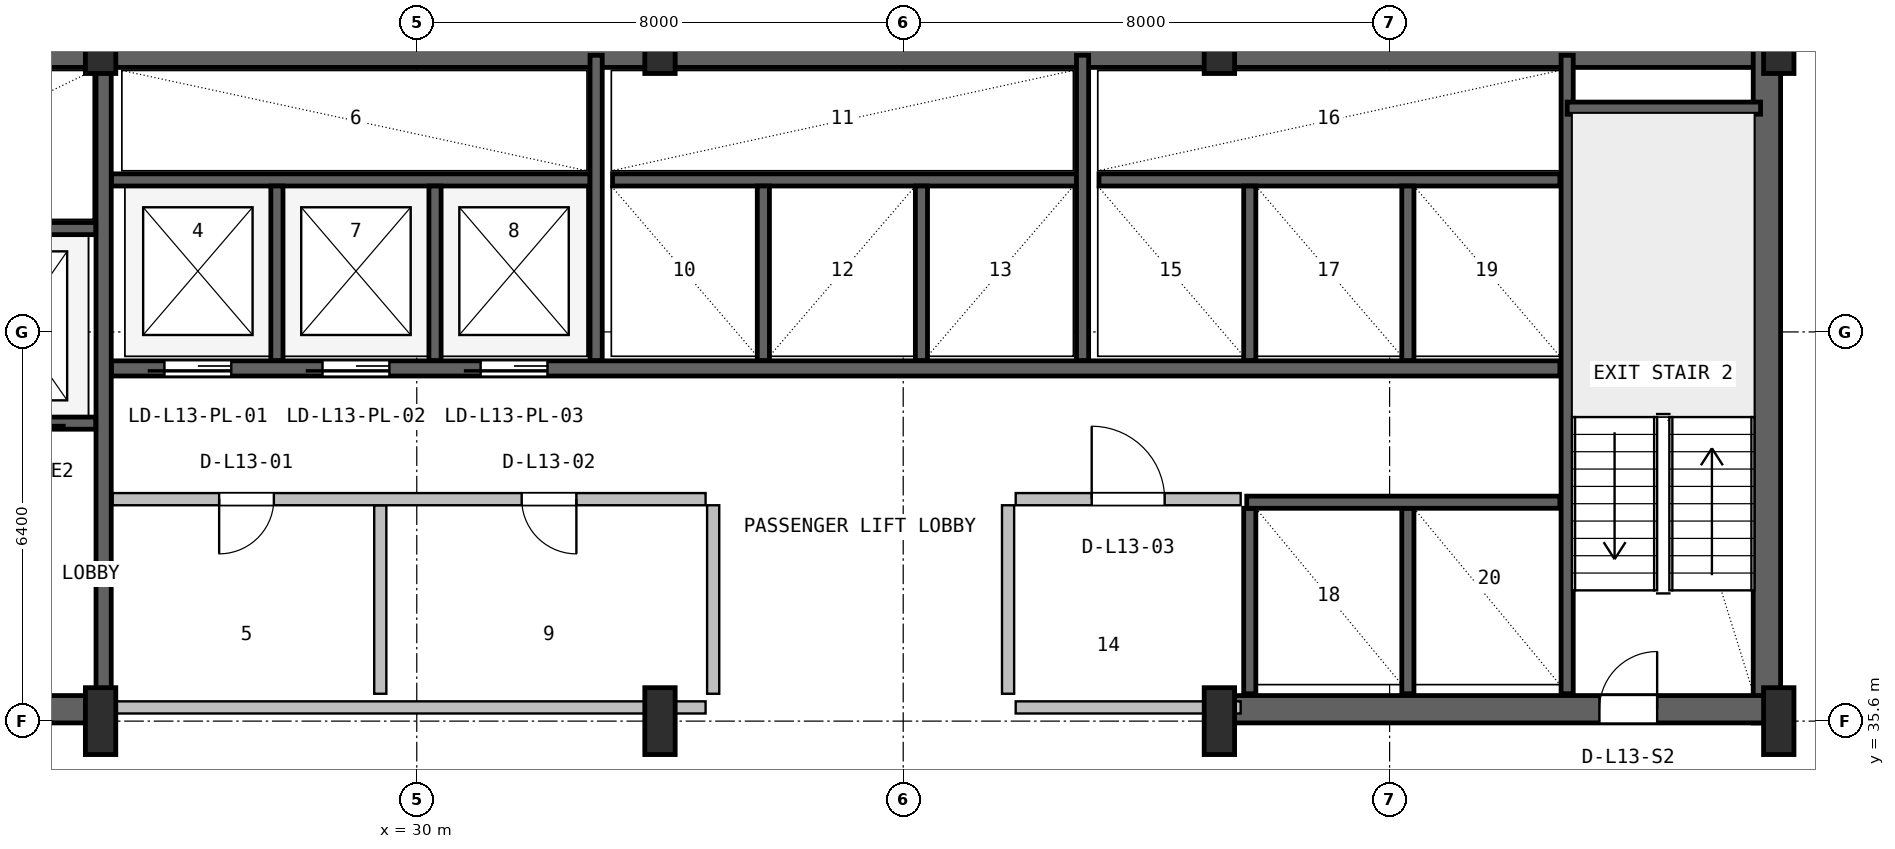
"""IFC4 building model, lengths in metres.
Left out: names, types, materials, properties, quantities, classifications, styles, units other than length and angle.
Written with IfcOpenShell. Run it as: python <this file> out.ifc"""

import sys

from ifc_helpers import new_model, si_unit, direction, frame, frame_2d, origin, origin_2d, place, context, subcontext, project, spatial, rectangle, i_section, extrude, source, transform, mapped, element, fill, save


model = new_model("IFC4")
c1 = context("Model", 3, precision=1e-05, world=origin(), true_north=direction((0.0, 1.0)))
c2 = subcontext(c1, "Body", "Model", "MODEL_VIEW")
j1 = project(units=[si_unit("LENGTHUNIT", "METRE"), si_unit("PLANEANGLEUNIT", "RADIAN")], contexts=[c1])
p1 = place(None, origin())
s1 = spatial("IfcSite", under=j1, at=p1, CompositionType="ELEMENT")
p2 = place(p1, origin())
s2 = spatial("IfcBuilding", under=s1, at=p2, CompositionType="ELEMENT")
p3 = place(p2, frame((0.0, 0.0, 58.8)))
s3 = spatial("IfcBuildingStorey", under=s2, at=p3, CompositionType="ELEMENT", Elevation=58.8)
p4 = place(p3, frame((15.6, 46.575, 0.0), z_axis=(0.0, 0.0, 1.0), x_axis=(1.0, 0.0, 0.0)))
e1 = element("IfcWall", 1, at=p4, inside=s3, PredefinedType="SHEAR", context=c2, shape_type="SweptSolid", body=[
    extrude(rectangle(XDim=36.8, YDim=0.45, at=frame_2d((18.4, 0.0))), origin(), (0.0, 0.0, 1.0), 3.65),
])
p5 = place(p3, frame((52.205, 35.57, 0.0), z_axis=(0.0, 0.0, 1.0), x_axis=(0.0, 1.0, 0.0)))
e2 = element("IfcWall", 2, at=p5, inside=s3, PredefinedType="SHEAR", context=c2, shape_type="SweptSolid", body=[
    extrude(rectangle(XDim=11.23, YDim=0.45, at=frame_2d((5.615, 0.0))), origin(), (0.0, 0.0, 1.0), 3.65),
])
p6 = place(p3, frame((15.57, 35.795, 0.0), z_axis=(0.0, 0.0, 1.0), x_axis=(1.0, 0.0, 0.0)))
e3 = element("IfcWall", 3, at=p6, inside=s3, PredefinedType="SHEAR", context=c2, shape_type="SweptSolid", body=[
    extrude(rectangle(XDim=9.23, YDim=0.45, at=frame_2d((4.615, 0.0))), origin(), (0.0, 0.0, 1.0), 3.65),
])
p7 = place(p6, frame((5.4, 0.0, 0.0)))
e4 = element("IfcOpeningElement", 4, at=p7, cuts=e3, PredefinedType="OPENING", context=c2, shape_type="SweptSolid", body=[
    extrude(rectangle(XDim=1.0, YDim=2.1, at=frame_2d((0.5, 1.05))), frame((0.0, 0.235, 0.0), z_axis=(0.0, -1.0, 0.0), x_axis=(1.0, 0.0, 0.0)), (0.0, 0.0, 1.0), 0.47),
])
p8 = place(p3, frame((43.2, 35.795, 0.0), z_axis=(0.0, 0.0, 1.0), x_axis=(1.0, 0.0, 0.0)))
e5 = element("IfcWall", 5, at=p8, inside=s3, PredefinedType="SHEAR", context=c2, shape_type="SweptSolid", body=[
    extrude(rectangle(XDim=9.23, YDim=0.45, at=frame_2d((4.615, 0.0))), origin(), (0.0, 0.0, 1.0), 3.65),
])
p9 = place(p8, frame((6.25, 0.0, 0.0)))
e6 = element("IfcOpeningElement", 6, at=p9, cuts=e5, PredefinedType="OPENING", context=c2, shape_type="SweptSolid", body=[
    extrude(rectangle(XDim=0.95, YDim=2.1, at=frame_2d((0.475, 1.05))), frame((0.0, 0.235, 0.0), z_axis=(0.0, -1.0, 0.0), x_axis=(1.0, 0.0, 0.0)), (0.0, 0.0, 1.0), 0.47),
])
m1 = source(origin(), c2, "Body", "SweptSolid", [
    extrude(i_section(OverallWidth=0.5, OverallDepth=1.1, WebThickness=0.018, FlangeThickness=0.032, FilletRadius=0.018, at=origin_2d()), origin(), (0.0, 0.0, 1.0), 3.9),
])
for number, where, z_axis, x_axis in (
    (7, (24.8, 35.6, 0.0), (0.0, 0.0, 1.0), (1.0, 0.0, 0.0)),
    (8, (24.8, 46.8, 0.0), (0.0, 0.0, 1.0), (1.0, 0.0, 0.0)),
    (9, (34.0, 35.6, 0.0), (0.0, 0.0, 1.0), (1.0, 0.0, 0.0)),
    (10, (34.0, 46.8, 0.0), (0.0, 0.0, 1.0), (1.0, 0.0, 0.0)),
    (11, (43.2, 35.6, 0.0), (0.0, 0.0, 1.0), (1.0, 0.0, 0.0)),
    (12, (43.2, 46.8, 0.0), (0.0, 0.0, 1.0), (1.0, 0.0, 0.0)),
    (13, (52.4, 35.6, 0.0), (0.0, 0.0, 1.0), (1.0, 0.0, 0.0)),
    (14, (52.4, 46.8, 0.0), (0.0, 0.0, 1.0), (1.0, 0.0, 0.0)),
):
    element("IfcColumn", number, at=place(p3, frame(where, z_axis=z_axis, x_axis=x_axis)), inside=s3, PredefinedType="COLUMN", context=c2, shape_type="MappedRepresentation", body=[
        mapped(m1, transform((0.0, 0.0, 0.0), x_axis=(1.0, 0.0, 0.0), y_axis=(0.0, 1.0, 0.0), z_axis=(0.0, 0.0, 1.0), scale=1.0)),
    ])
p10 = place(p3, frame((24.85, 36.05, 0.0), z_axis=(0.0, 0.0, 1.0), x_axis=(0.0, 1.0, 0.0)))
e15 = element("IfcWall", 15, at=p10, inside=s3, PredefinedType="SHEAR", context=c2, shape_type="SweptSolid", body=[
    extrude(rectangle(XDim=10.45, YDim=0.25, at=frame_2d((5.225, 0.0))), origin(), (0.0, 0.0, 1.0), 3.65),
])
p11 = place(p3, frame((19.2, 40.5, 0.0), z_axis=(0.0, 0.0, 1.0), x_axis=(1.0, 0.0, 0.0)))
e16 = element("IfcWall", 16, at=p11, inside=s3, PredefinedType="SHEAR", context=c2, shape_type="SweptSolid", body=[
    extrude(rectangle(XDim=5.52, YDim=0.2, at=frame_2d((2.76, 0.0))), origin(), (0.0, 0.0, 1.0), 3.65),
])
p12 = place(p11, frame((1.05, 0.0, 0.0)))
e17 = element("IfcOpeningElement", 17, at=p12, cuts=e16, PredefinedType="OPENING", context=c2, shape_type="SweptSolid", body=[
    extrude(rectangle(XDim=1.1, YDim=2.18, at=frame_2d((0.55, 1.09))), frame((0.0, 0.11, 0.0), z_axis=(0.0, -1.0, 0.0), x_axis=(1.0, 0.0, 0.0)), (0.0, 0.0, 1.0), 0.22),
])
p13 = place(p11, frame((3.65, 0.0, 0.0)))
e18 = element("IfcOpeningElement", 18, at=p13, cuts=e16, PredefinedType="OPENING", context=c2, shape_type="SweptSolid", body=[
    extrude(rectangle(XDim=1.1, YDim=2.18, at=frame_2d((0.55, 1.09))), frame((0.0, 0.11, 0.0), z_axis=(0.0, -1.0, 0.0), x_axis=(1.0, 0.0, 0.0)), (0.0, 0.0, 1.0), 0.22),
])
p14 = place(p3, frame((19.2, 43.7, 0.0), z_axis=(0.0, 0.0, 1.0), x_axis=(1.0, 0.0, 0.0)))
e19 = element("IfcWall", 19, at=p14, inside=s3, PredefinedType="SHEAR", context=c2, shape_type="SweptSolid", body=[
    extrude(rectangle(XDim=5.52, YDim=0.2, at=frame_2d((2.76, 0.0))), origin(), (0.0, 0.0, 1.0), 3.65),
])
p15 = place(p3, frame((48.92, 36.05, 0.0), z_axis=(0.0, 0.0, 1.0), x_axis=(0.0, 1.0, 0.0)))
e20 = element("IfcWall", 20, at=p15, inside=s3, PredefinedType="SHEAR", context=c2, shape_type="SweptSolid", body=[
    extrude(rectangle(XDim=10.5, YDim=0.2, at=frame_2d((5.25, 0.0))), origin(), (0.0, 0.0, 1.0), 3.65),
])
p16 = place(p3, frame((48.92, 45.68, 0.0), z_axis=(0.0, 0.0, 1.0), x_axis=(1.0, 0.0, 0.0)))
e21 = element("IfcWall", 21, at=p16, inside=s3, PredefinedType="SHEAR", context=c2, shape_type="SweptSolid", body=[
    extrude(rectangle(XDim=3.18, YDim=0.2, at=frame_2d((1.59, 0.0))), origin(), (0.0, 0.0, 1.0), 3.65),
])
p17 = place(p3, frame((24.98, 41.4, 0.0), z_axis=(0.0, 0.0, 1.0), x_axis=(1.0, 0.0, 0.0)))
e22 = element("IfcWall", 22, at=p17, inside=s3, PredefinedType="SHEAR", context=c2, shape_type="SweptSolid", body=[
    extrude(rectangle(XDim=23.82, YDim=0.25, at=frame_2d((11.91, 0.0))), origin(), (0.0, 0.0, 1.0), 3.65),
])
p18 = place(p17, frame((0.87, 0.0, 0.0)))
e23 = element("IfcOpeningElement", 23, at=p18, cuts=e22, PredefinedType="OPENING", context=c2, shape_type="SweptSolid", body=[
    extrude(rectangle(XDim=1.1, YDim=2.18, at=frame_2d((0.55, 1.09))), frame((0.0, 0.135, 0.0), z_axis=(0.0, -1.0, 0.0), x_axis=(1.0, 0.0, 0.0)), (0.0, 0.0, 1.0), 0.27),
])
p19 = place(p17, frame((3.47, 0.0, 0.0)))
e24 = element("IfcOpeningElement", 24, at=p19, cuts=e22, PredefinedType="OPENING", context=c2, shape_type="SweptSolid", body=[
    extrude(rectangle(XDim=1.1, YDim=2.18, at=frame_2d((0.55, 1.09))), frame((0.0, 0.135, 0.0), z_axis=(0.0, -1.0, 0.0), x_axis=(1.0, 0.0, 0.0)), (0.0, 0.0, 1.0), 0.27),
])
p20 = place(p17, frame((6.07, 0.0, 0.0)))
e25 = element("IfcOpeningElement", 25, at=p20, cuts=e22, PredefinedType="OPENING", context=c2, shape_type="SweptSolid", body=[
    extrude(rectangle(XDim=1.1, YDim=2.18, at=frame_2d((0.55, 1.09))), frame((0.0, 0.135, 0.0), z_axis=(0.0, -1.0, 0.0), x_axis=(1.0, 0.0, 0.0)), (0.0, 0.0, 1.0), 0.27),
])
p21 = place(p3, frame((24.98, 44.5, 0.0), z_axis=(0.0, 0.0, 1.0), x_axis=(1.0, 0.0, 0.0)))
e26 = element("IfcWall", 26, at=p21, inside=s3, PredefinedType="SHEAR", context=c2, shape_type="SweptSolid", body=[
    extrude(rectangle(XDim=7.87, YDim=0.2, at=frame_2d((3.935, 0.0))), origin(), (0.0, 0.0, 1.0), 3.65),
])
for number, where, z_axis, x_axis in (
    (27, (27.7, 41.53, 0.0), (0.0, 0.0, 1.0), (0.0, 1.0, 0.0)),
    (28, (30.3, 41.53, 0.0), (0.0, 0.0, 1.0), (0.0, 1.0, 0.0)),
):
    element("IfcWall", number, at=place(p3, frame(where, z_axis=z_axis, x_axis=x_axis)), inside=s3, PredefinedType="SHEAR", context=c2, shape_type="SweptSolid", body=[
        extrude(rectangle(XDim=2.87, YDim=0.2, at=frame_2d((1.435, 0.0))), origin(), (0.0, 0.0, 1.0), 3.65),
    ])
p22 = place(p3, frame((32.95, 41.53, 0.0), z_axis=(0.0, 0.0, 1.0), x_axis=(0.0, 1.0, 0.0)))
e29 = element("IfcWall", 29, at=p22, inside=s3, PredefinedType="SHEAR", context=c2, shape_type="SweptSolid", body=[
    extrude(rectangle(XDim=5.02, YDim=0.2, at=frame_2d((2.51, 0.0))), origin(), (0.0, 0.0, 1.0), 3.65),
])
p23 = place(p3, frame((33.22, 44.5, 0.0), z_axis=(0.0, 0.0, 1.0), x_axis=(1.0, 0.0, 0.0)))
e30 = element("IfcWall", 30, at=p23, inside=s3, PredefinedType="SHEAR", context=c2, shape_type="SweptSolid", body=[
    extrude(rectangle(XDim=7.63, YDim=0.2, at=frame_2d((3.815, 0.0))), origin(), (0.0, 0.0, 1.0), 3.65),
])
for number, where, z_axis, x_axis in (
    (31, (35.7, 41.53, 0.0), (0.0, 0.0, 1.0), (0.0, 1.0, 0.0)),
    (32, (38.3, 41.53, 0.0), (0.0, 0.0, 1.0), (0.0, 1.0, 0.0)),
):
    element("IfcWall", number, at=place(p3, frame(where, z_axis=z_axis, x_axis=x_axis)), inside=s3, PredefinedType="SHEAR", context=c2, shape_type="SweptSolid", body=[
        extrude(rectangle(XDim=2.87, YDim=0.2, at=frame_2d((1.435, 0.0))), origin(), (0.0, 0.0, 1.0), 3.65),
    ])
p24 = place(p3, frame((40.95, 41.53, 0.0), z_axis=(0.0, 0.0, 1.0), x_axis=(0.0, 1.0, 0.0)))
e33 = element("IfcWall", 33, at=p24, inside=s3, PredefinedType="SHEAR", context=c2, shape_type="SweptSolid", body=[
    extrude(rectangle(XDim=5.02, YDim=0.2, at=frame_2d((2.51, 0.0))), origin(), (0.0, 0.0, 1.0), 3.65),
])
p25 = place(p3, frame((41.22, 44.5, 0.0), z_axis=(0.0, 0.0, 1.0), x_axis=(1.0, 0.0, 0.0)))
e34 = element("IfcWall", 34, at=p25, inside=s3, PredefinedType="SHEAR", context=c2, shape_type="SweptSolid", body=[
    extrude(rectangle(XDim=7.58, YDim=0.2, at=frame_2d((3.79, 0.0))), origin(), (0.0, 0.0, 1.0), 3.65),
])
for number, where, z_axis, x_axis in (
    (35, (43.7, 41.53, 0.0), (0.0, 0.0, 1.0), (0.0, 1.0, 0.0)),
    (36, (46.3, 41.53, 0.0), (0.0, 0.0, 1.0), (0.0, 1.0, 0.0)),
):
    element("IfcWall", number, at=place(p3, frame(where, z_axis=z_axis, x_axis=x_axis)), inside=s3, PredefinedType="SHEAR", context=c2, shape_type="SweptSolid", body=[
        extrude(rectangle(XDim=2.87, YDim=0.2, at=frame_2d((1.435, 0.0))), origin(), (0.0, 0.0, 1.0), 3.65),
    ])
for number, where, z_axis, x_axis in (
    (37, (43.7, 36.05, 0.0), (0.0, 0.0, 1.0), (0.0, 1.0, 0.0)),
    (38, (46.3, 36.05, 0.0), (0.0, 0.0, 1.0), (0.0, 1.0, 0.0)),
):
    element("IfcWall", number, at=place(p3, frame(where, z_axis=z_axis, x_axis=x_axis)), inside=s3, PredefinedType="SHEAR", context=c2, shape_type="SweptSolid", body=[
        extrude(rectangle(XDim=3.05, YDim=0.2, at=frame_2d((1.525, 0.0))), origin(), (0.0, 0.0, 1.0), 3.65),
    ])
p26 = place(p3, frame((43.65, 39.2, 0.0), z_axis=(0.0, 0.0, 1.0), x_axis=(1.0, 0.0, 0.0)))
e39 = element("IfcWall", 39, at=p26, inside=s3, PredefinedType="SHEAR", context=c2, shape_type="SweptSolid", body=[
    extrude(rectangle(XDim=5.15, YDim=0.2, at=frame_2d((2.575, 0.0))), origin(), (0.0, 0.0, 1.0), 3.65),
])
p27 = place(p3, frame((25.0, 35.825, 0.0), z_axis=(0.0, 0.0, 1.0), x_axis=(1.0, 0.0, 0.0)))
e40 = element("IfcWall", 40, at=p27, inside=s3, PredefinedType="PLUMBINGWALL", context=c2, shape_type="SweptSolid", body=[
    extrude(rectangle(XDim=9.75, YDim=0.2, at=frame_2d((4.875, 0.0))), origin(), (0.0, 0.0, 1.0), 2.425),
])
p28 = place(p3, frame((29.4, 36.05, 0.0), z_axis=(0.0, 0.0, 1.0), x_axis=(0.0, 1.0, 0.0)))
e41 = element("IfcWall", 41, at=p28, inside=s3, PredefinedType="PLUMBINGWALL", context=c2, shape_type="SweptSolid", body=[
    extrude(rectangle(XDim=3.1, YDim=0.2, at=frame_2d((1.55, 0.0))), origin(), (0.0, 0.0, 1.0), 3.63),
])
p29 = place(p3, frame((25.0, 39.25, 0.0), z_axis=(0.0, 0.0, 1.0), x_axis=(1.0, 0.0, 0.0)))
e42 = element("IfcWall", 42, at=p29, inside=s3, PredefinedType="PLUMBINGWALL", context=c2, shape_type="SweptSolid", body=[
    extrude(rectangle(XDim=9.75, YDim=0.2, at=frame_2d((4.875, 0.0))), origin(), (0.0, 0.0, 1.0), 3.63),
])
p30 = place(p29, frame((1.75, 0.0, 0.0)))
e43 = element("IfcOpeningElement", 43, at=p30, cuts=e42, PredefinedType="OPENING", context=c2, shape_type="SweptSolid", body=[
    extrude(rectangle(XDim=0.9, YDim=2.06, at=frame_2d((0.45, 1.03))), frame((0.0, 0.11, 0.0), z_axis=(0.0, -1.0, 0.0), x_axis=(1.0, 0.0, 0.0)), (0.0, 0.0, 1.0), 0.22),
])
p31 = place(p29, frame((6.725, 0.0, 0.0)))
e44 = element("IfcOpeningElement", 44, at=p31, cuts=e42, PredefinedType="OPENING", context=c2, shape_type="SweptSolid", body=[
    extrude(rectangle(XDim=0.9, YDim=2.06, at=frame_2d((0.45, 1.03))), frame((0.0, 0.11, 0.0), z_axis=(0.0, -1.0, 0.0), x_axis=(1.0, 0.0, 0.0)), (0.0, 0.0, 1.0), 0.22),
])
p32 = place(p3, frame((34.875, 36.05, 0.0), z_axis=(0.0, 0.0, 1.0), x_axis=(0.0, 1.0, 0.0)))
e45 = element("IfcWall", 45, at=p32, inside=s3, PredefinedType="PLUMBINGWALL", context=c2, shape_type="SweptSolid", body=[
    extrude(rectangle(XDim=3.1, YDim=0.2, at=frame_2d((1.55, 0.0))), origin(), (0.0, 0.0, 1.0), 3.63),
])
p33 = place(p3, frame((39.85, 35.825, 0.0), z_axis=(0.0, 0.0, 1.0), x_axis=(1.0, 0.0, 0.0)))
e46 = element("IfcWall", 46, at=p33, inside=s3, PredefinedType="SOLIDWALL", context=c2, shape_type="SweptSolid", body=[
    extrude(rectangle(XDim=3.7, YDim=0.2, at=frame_2d((1.85, 0.0))), origin(), (0.0, 0.0, 1.0), 2.425),
])
p34 = place(p3, frame((39.85, 39.25, 0.0), z_axis=(0.0, 0.0, 1.0), x_axis=(1.0, 0.0, 0.0)))
e47 = element("IfcWall", 47, at=p34, inside=s3, PredefinedType="SOLIDWALL", context=c2, shape_type="SweptSolid", body=[
    extrude(rectangle(XDim=3.7, YDim=0.2, at=frame_2d((1.85, 0.0))), origin(), (0.0, 0.0, 1.0), 3.63),
])
p35 = place(p34, frame((1.25, 0.0, 0.0)))
e48 = element("IfcOpeningElement", 48, at=p35, cuts=e47, PredefinedType="OPENING", context=c2, shape_type="SweptSolid", body=[
    extrude(rectangle(XDim=1.2, YDim=2.1, at=frame_2d((0.6, 1.05))), frame((0.0, 0.11, 0.0), z_axis=(0.0, -1.0, 0.0), x_axis=(1.0, 0.0, 0.0)), (0.0, 0.0, 1.0), 0.22),
])
p36 = place(p3, frame((39.725, 36.05, 0.0), z_axis=(0.0, 0.0, 1.0), x_axis=(0.0, 1.0, 0.0)))
e49 = element("IfcWall", 49, at=p36, inside=s3, PredefinedType="SOLIDWALL", context=c2, shape_type="SweptSolid", body=[
    extrude(rectangle(XDim=3.1, YDim=0.2, at=frame_2d((1.55, 0.0))), origin(), (0.0, 0.0, 1.0), 3.63),
])
m2 = source(origin(), c2, "Body", "SweptSolid", [
    extrude(rectangle(XDim=0.95, YDim=2.1, at=frame_2d((0.475, 1.05))), frame((0.0, 0.025, 0.0), z_axis=(0.0, -1.0, 0.0), x_axis=(1.0, 0.0, 0.0)), (0.0, 0.0, 1.0), 0.05),
])
p37 = place(p9, origin())
e50 = element("IfcDoor", 50, at=p37, inside=s3, OperationType="SINGLE_SWING_RIGHT", PredefinedType="DOOR", context=c2, shape_type="MappedRepresentation", body=[
    mapped(m2, transform((0.0, 0.0, 0.0), x_axis=(1.0, 0.0, 0.0), y_axis=(0.0, 1.0, 0.0), z_axis=(0.0, 0.0, 1.0), scale=1.0)),
])
fill(e6, e50)
m3 = source(origin(), c2, "Body", "SweptSolid", [
    extrude(rectangle(XDim=1.1, YDim=2.18, at=frame_2d((0.55, 1.09))), frame((0.0, 0.025, 0.0), z_axis=(0.0, -1.0, 0.0), x_axis=(1.0, 0.0, 0.0)), (0.0, 0.0, 1.0), 0.05),
])
p38 = place(p18, frame((1.1, 0.0, 0.0), z_axis=(0.0, 0.0, 1.0), x_axis=(-1.0, 0.0, 0.0)))
e51 = element("IfcDoor", 51, at=p38, inside=s3, OperationType="SLIDING_TO_LEFT", PredefinedType="DOOR", context=c2, shape_type="MappedRepresentation", body=[
    mapped(m3, transform((0.0, 0.0, 0.0), x_axis=(1.0, 0.0, 0.0), y_axis=(0.0, 1.0, 0.0), z_axis=(0.0, 0.0, 1.0), scale=1.0)),
])
fill(e23, e51)
p39 = place(p19, frame((1.1, 0.0, 0.0), z_axis=(0.0, 0.0, 1.0), x_axis=(-1.0, 0.0, 0.0)))
e52 = element("IfcDoor", 52, at=p39, inside=s3, OperationType="SLIDING_TO_LEFT", PredefinedType="DOOR", context=c2, shape_type="MappedRepresentation", body=[
    mapped(m3, transform((0.0, 0.0, 0.0), x_axis=(1.0, 0.0, 0.0), y_axis=(0.0, 1.0, 0.0), z_axis=(0.0, 0.0, 1.0), scale=1.0)),
])
fill(e24, e52)
p40 = place(p20, frame((1.1, 0.0, 0.0), z_axis=(0.0, 0.0, 1.0), x_axis=(-1.0, 0.0, 0.0)))
e53 = element("IfcDoor", 53, at=p40, inside=s3, OperationType="SLIDING_TO_LEFT", PredefinedType="DOOR", context=c2, shape_type="MappedRepresentation", body=[
    mapped(m3, transform((0.0, 0.0, 0.0), x_axis=(1.0, 0.0, 0.0), y_axis=(0.0, 1.0, 0.0), z_axis=(0.0, 0.0, 1.0), scale=1.0)),
])
fill(e25, e53)
m4 = source(origin(), c2, "Body", "SweptSolid", [
    extrude(rectangle(XDim=0.9, YDim=2.06, at=frame_2d((0.45, 1.03))), frame((0.0, 0.025, 0.0), z_axis=(0.0, -1.0, 0.0), x_axis=(1.0, 0.0, 0.0)), (0.0, 0.0, 1.0), 0.05),
])
p41 = place(p30, frame((0.9, 0.0, 0.0), z_axis=(0.0, 0.0, 1.0), x_axis=(-1.0, 0.0, 0.0)))
e54 = element("IfcDoor", 54, at=p41, inside=s3, OperationType="SINGLE_SWING_LEFT", PredefinedType="DOOR", context=c2, shape_type="MappedRepresentation", body=[
    mapped(m4, transform((0.0, 0.0, 0.0), x_axis=(1.0, 0.0, 0.0), y_axis=(0.0, 1.0, 0.0), z_axis=(0.0, 0.0, 1.0), scale=1.0)),
])
fill(e43, e54)
p42 = place(p31, frame((0.9, 0.0, 0.0), z_axis=(0.0, 0.0, 1.0), x_axis=(-1.0, 0.0, 0.0)))
e55 = element("IfcDoor", 55, at=p42, inside=s3, OperationType="SINGLE_SWING_RIGHT", PredefinedType="DOOR", context=c2, shape_type="MappedRepresentation", body=[
    mapped(m4, transform((0.0, 0.0, 0.0), x_axis=(1.0, 0.0, 0.0), y_axis=(0.0, 1.0, 0.0), z_axis=(0.0, 0.0, 1.0), scale=1.0)),
])
fill(e44, e55)
m5 = source(origin(), c2, "Body", "SweptSolid", [
    extrude(rectangle(XDim=1.2, YDim=2.1, at=frame_2d((0.6, 1.05))), frame((0.0, 0.025, 0.0), z_axis=(0.0, -1.0, 0.0), x_axis=(1.0, 0.0, 0.0)), (0.0, 0.0, 1.0), 0.05),
])
p43 = place(p35, origin())
e56 = element("IfcDoor", 56, at=p43, inside=s3, OperationType="SINGLE_SWING_LEFT", PredefinedType="DOOR", context=c2, shape_type="MappedRepresentation", body=[
    mapped(m5, transform((0.0, 0.0, 0.0), x_axis=(1.0, 0.0, 0.0), y_axis=(0.0, 1.0, 0.0), z_axis=(0.0, 0.0, 1.0), scale=1.0)),
])
fill(e48, e56)
save(model, sys.argv[1])
